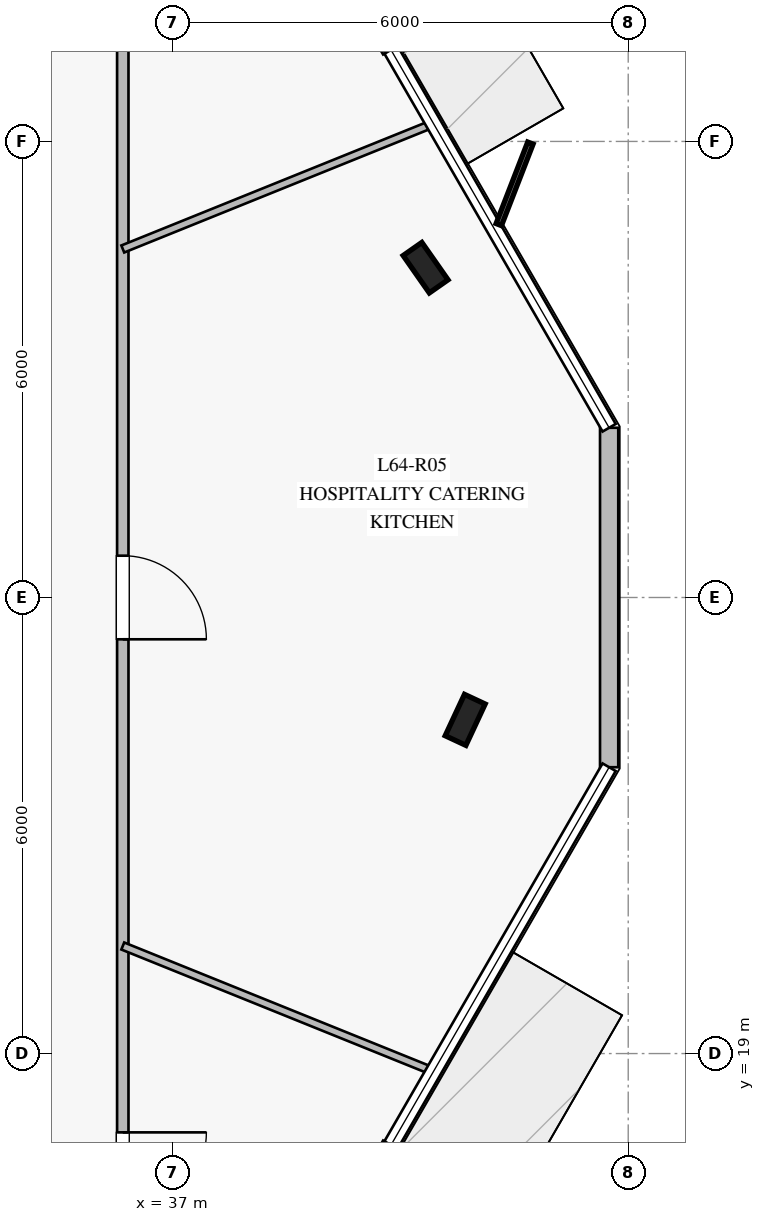
"""IFC4 building model, lengths in metres.
Left out: names, types, materials, properties, quantities, classifications, styles, units other than length and angle.
Written with IfcOpenShell. Run it as: python <this file> out.ifc"""

import sys

from ifc_helpers import new_model, si_unit, direction, frame, frame_2d, origin, origin_2d, place, context, subcontext, project, spatial, rectangle, i_section, extrude, element, fill, save


model = new_model("IFC4")
c1 = context("Model", 3, precision=1e-05, world=origin(), true_north=direction((0.0, 1.0)))
c2 = subcontext(c1, "Body", "Model", "MODEL_VIEW")
j1 = project(units=[si_unit("LENGTHUNIT", "METRE"), si_unit("PLANEANGLEUNIT", "RADIAN")], contexts=[c1])
p1 = place(None, origin())
s1 = spatial("IfcSite", under=j1, at=p1, CompositionType="ELEMENT")
p2 = place(p1, origin())
s2 = spatial("IfcBuilding", under=s1, at=p2, CompositionType="ELEMENT")
p3 = place(p2, frame((0.0, 0.0, 266.2)))
s3 = spatial("IfcBuildingStorey", under=s2, at=p3, CompositionType="ELEMENT", Elevation=266.2)
for number, where, z_axis, x_axis in (
    (1, (40.855, 23.39, 0.0), (0.0, 0.0, 1.0), (0.423, 0.906, 0.0)),
    (2, (40.334, 29.339, 0.0), (0.0, 0.0, 1.0), (-0.574, 0.819, 0.0)),
):
    element("IfcColumn", number, at=place(p3, frame(where, z_axis=z_axis, x_axis=x_axis)), inside=s3, PredefinedType="COLUMN", context=c2, shape_type="SweptSolid", body=[
        extrude(i_section(OverallWidth=0.3, OverallDepth=0.6, WebThickness=0.015, FlangeThickness=0.03, at=origin_2d()), origin(), (0.0, 0.0, 1.0), 4.0),
    ])
p4 = place(p3, frame((38.679, 15.717, 0.0), z_axis=(0.0, 0.0, 1.0), x_axis=(0.499913221443, 0.866075499611, 0.0)))
e3 = element("IfcWall", 3, at=p4, inside=s3, PredefinedType="STANDARD", context=c2, shape_type="SweptSolid", body=[
    extrude(rectangle(XDim=2.4, YDim=0.24, at=frame_2d((1.2, 0.0))), origin(), (0.0, 0.0, 1.0), 3.78),
])
p5 = place(p4, frame((0.4, 0.0, 0.0)))
e4 = element("IfcOpeningElement", 4, at=p5, cuts=e3, PredefinedType="OPENING", context=c2, shape_type="SweptSolid", body=[
    extrude(rectangle(XDim=1.6, YDim=2.25, at=frame_2d((0.8, 1.125))), frame((0.0, 0.13, 0.0), z_axis=(0.0, -1.0, 0.0), x_axis=(1.0, 0.0, 0.0)), (0.0, 0.0, 1.0), 0.26),
])
p6 = place(p3, frame((42.749, 22.767, 0.0), z_axis=(0.0, 0.0, 1.0), x_axis=(0.0, 1.0, 0.0)))
e5 = element("IfcWall", 5, at=p6, inside=s3, PredefinedType="STANDARD", context=c2, shape_type="SweptSolid", body=[
    extrude(rectangle(XDim=4.466, YDim=0.24, at=frame_2d((2.233, 0.0))), origin(), (0.0, 0.0, 1.0), 3.78),
])
p7 = place(p3, frame((39.879, 32.204, 0.0), z_axis=(0.0, 0.0, 1.0), x_axis=(-0.499913221443, 0.866075499611, 0.0)))
e6 = element("IfcWall", 6, at=p7, inside=s3, PredefinedType="STANDARD", context=c2, shape_type="SweptSolid", body=[
    extrude(rectangle(XDim=2.4, YDim=0.24, at=frame_2d((1.2, 0.0))), origin(), (0.0, 0.0, 1.0), 3.78),
])
p8 = place(p7, frame((0.4, 0.0, 0.0)))
e7 = element("IfcOpeningElement", 7, at=p8, cuts=e6, PredefinedType="OPENING", context=c2, shape_type="SweptSolid", body=[
    extrude(rectangle(XDim=1.6, YDim=2.25, at=frame_2d((0.8, 1.125))), frame((0.0, 0.13, 0.0), z_axis=(0.0, -1.0, 0.0), x_axis=(1.0, 0.0, 0.0)), (0.0, 0.0, 1.0), 0.26),
])
p9 = place(p3, frame((36.35, 35.75, 0.0), z_axis=(0.0, 0.0, 1.0), x_axis=(0.0, -1.0, 0.0)))
e8 = element("IfcWall", 8, at=p9, inside=s3, PredefinedType="PARTITIONING", context=c2, shape_type="SweptSolid", body=[
    extrude(rectangle(XDim=21.5, YDim=0.15, at=frame_2d((10.75, 0.0))), origin(), (0.0, 0.0, 1.0), 2.43),
])
p10 = place(p9, frame((17.787, 0.0, 0.0)))
e9 = element("IfcOpeningElement", 9, at=p10, cuts=e8, PredefinedType="OPENING", context=c2, shape_type="SweptSolid", body=[
    extrude(rectangle(XDim=1.1, YDim=2.2, at=frame_2d((0.55, 1.1))), frame((0.0, 0.085, 0.0), z_axis=(0.0, -1.0, 0.0), x_axis=(1.0, 0.0, 0.0)), (0.0, 0.0, 1.0), 0.17),
])
p11 = place(p9, frame((10.2, 0.0, 0.0)))
e10 = element("IfcOpeningElement", 10, at=p11, cuts=e8, PredefinedType="OPENING", context=c2, shape_type="SweptSolid", body=[
    extrude(rectangle(XDim=1.1, YDim=2.2, at=frame_2d((0.55, 1.1))), frame((0.0, 0.085, 0.0), z_axis=(0.0, -1.0, 0.0), x_axis=(1.0, 0.0, 0.0)), (0.0, 0.0, 1.0), 0.17),
])
p12 = place(p3, frame((36.35, 20.415, 0.0), z_axis=(0.0, 0.0, 1.0), x_axis=(0.927229589725, -0.374493375026, 0.0)))
e11 = element("IfcWall", 11, at=p12, inside=s3, PredefinedType="MOVABLE", context=c2, shape_type="SweptSolid", body=[
    extrude(rectangle(XDim=4.393, YDim=0.1, at=frame_2d((2.196, 0.0))), origin(), (0.0, 0.0, 1.0), 2.43),
])
p13 = place(p3, frame((36.35, 29.585, 0.0), z_axis=(0.0, 0.0, 1.0), x_axis=(0.927229589725, 0.374493375026, 0.0)))
e12 = element("IfcWall", 12, at=p13, inside=s3, PredefinedType="MOVABLE", context=c2, shape_type="SweptSolid", body=[
    extrude(rectangle(XDim=4.393, YDim=0.1, at=frame_2d((2.196, 0.0))), origin(), (0.0, 0.0, 1.0), 3.28),
])
p14 = place(p10, origin())
e13 = element("IfcDoor", 13, at=p14, inside=s3, OperationType="SINGLE_SWING_LEFT", PredefinedType="DOOR", context=c2, shape_type="SweptSolid", body=[
    extrude(rectangle(XDim=1.1, YDim=2.2, at=frame_2d((0.55, 1.1))), frame((0.0, 0.025, 0.0), z_axis=(0.0, -1.0, 0.0), x_axis=(1.0, 0.0, 0.0)), (0.0, 0.0, 1.0), 0.05),
])
fill(e9, e13)
p15 = place(p11, origin())
e14 = element("IfcDoor", 14, at=p15, inside=s3, OperationType="SINGLE_SWING_RIGHT", PredefinedType="DOOR", context=c2, shape_type="SweptSolid", body=[
    extrude(rectangle(XDim=1.1, YDim=2.2, at=frame_2d((0.55, 1.1))), frame((0.0, 0.025, 0.0), z_axis=(0.0, -1.0, 0.0), x_axis=(1.0, 0.0, 0.0)), (0.0, 0.0, 1.0), 0.05),
])
fill(e10, e14)
save(model, sys.argv[1])
